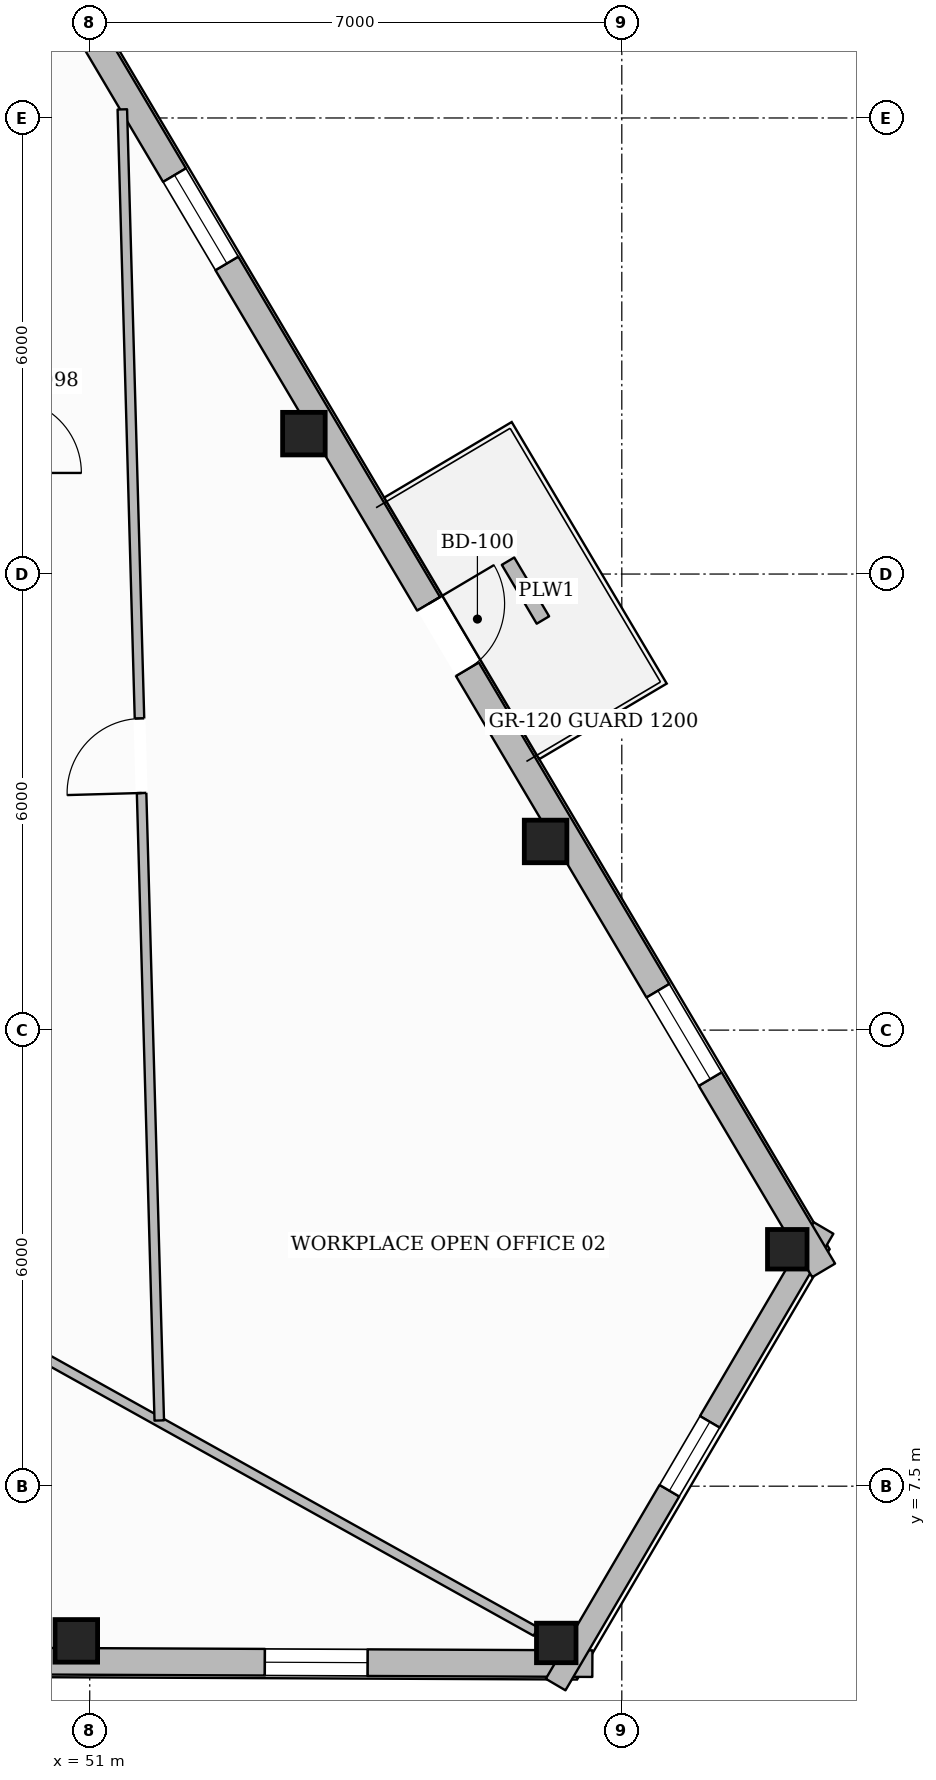
"""IFC4 building model, lengths in metres.
Left out: names, types, materials, properties, quantities, classifications, styles, units other than length and angle.
Written with IfcOpenShell. Run it as: python <this file> out.ifc"""

import sys

from ifc_helpers import new_model, si_unit, direction, frame, frame_2d, origin, origin_2d, place, context, subcontext, project, spatial, rectangle, hollow_rectangle, extrude, element, fill, save


model = new_model("IFC4")
c1 = context("Model", 3, precision=1e-05, world=origin(), true_north=direction((0.0, 1.0)))
c2 = subcontext(c1, "Body", "Model", "MODEL_VIEW")
j1 = project(units=[si_unit("LENGTHUNIT", "METRE"), si_unit("PLANEANGLEUNIT", "RADIAN")], contexts=[c1])
p1 = place(None, origin())
s1 = spatial("IfcSite", under=j1, at=p1, CompositionType="ELEMENT")
p2 = place(p1, origin())
s2 = spatial("IfcBuilding", under=s1, at=p2, CompositionType="ELEMENT")
p3 = place(p2, frame((0.0, 0.0, 270.3)))
s3 = spatial("IfcBuildingStorey", under=s2, at=p3, CompositionType="ELEMENT", Elevation=270.3)
p4 = place(p3, frame((50.823, 5.465, 0.0), z_axis=(0.0, 0.0, 1.0), x_axis=(1.0, 0.0, 0.0)))
e1 = element("IfcColumn", 1, at=p4, inside=s3, PredefinedType="COLUMN", context=c2, shape_type="SweptSolid", body=[
    extrude(hollow_rectangle(XDim=0.56, YDim=0.56, WallThickness=0.025, at=origin_2d()), origin(), (0.0, 0.0, 1.0), 3.61),
])
for number, where, z_axis, x_axis in (
    (2, (57.138, 5.438, 0.0), (0.0, 0.0, 1.0), (1.0, 0.0, 0.0)),
    (3, (60.177, 10.617, 0.0), (0.0, 0.0, 1.0), (1.0, 0.0, 0.0)),
):
    element("IfcColumn", number, at=place(p3, frame(where, z_axis=z_axis, x_axis=x_axis)), inside=s3, PredefinedType="COLUMN", context=c2, shape_type="SweptSolid", body=[
        extrude(hollow_rectangle(XDim=0.52, YDim=0.52, WallThickness=0.024, at=origin_2d()), origin(), (0.0, 0.0, 1.0), 3.61),
    ])
for number, where, z_axis, x_axis in (
    (4, (56.997, 15.982, 0.0), (0.0, 0.0, 1.0), (1.0, 0.0, 0.0)),
    (5, (53.817, 21.347, 0.0), (0.0, 0.0, 1.0), (1.0, 0.0, 0.0)),
):
    element("IfcColumn", number, at=place(p3, frame(where, z_axis=z_axis, x_axis=x_axis)), inside=s3, PredefinedType="COLUMN", context=c2, shape_type="SweptSolid", body=[
        extrude(hollow_rectangle(XDim=0.56, YDim=0.56, WallThickness=0.025, at=origin_2d()), origin(), (0.0, 0.0, 1.0), 3.61),
    ])
p5 = place(p3, frame((57.613, 5.165, 0.0), z_axis=(0.0, 0.0, 1.0), x_axis=(-0.99999050908, 0.004356805123, 0.0)))
e6 = element("IfcWall", 6, at=p5, inside=s3, PredefinedType="STANDARD", context=c2, shape_type="SweptSolid", body=[
    extrude(rectangle(XDim=38.833, YDim=0.35, at=frame_2d((19.417, 0.0))), origin(), (0.0, 0.0, 1.0), 3.196),
])
p6 = place(p5, frame((34.529, 0.0, 0.65)))
e7 = element("IfcOpeningElement", 7, at=p6, cuts=e6, PredefinedType="OPENING", context=c2, shape_type="SweptSolid", body=[
    extrude(rectangle(XDim=1.35, YDim=1.75, at=frame_2d((0.675, 0.875))), frame((0.0, 0.185, 0.0), z_axis=(0.0, -1.0, 0.0), x_axis=(1.0, 0.0, 0.0)), (0.0, 0.0, 1.0), 0.37),
])
p7 = place(p5, frame((28.215, 0.0, 0.65)))
e8 = element("IfcOpeningElement", 8, at=p7, cuts=e6, PredefinedType="OPENING", context=c2, shape_type="SweptSolid", body=[
    extrude(rectangle(XDim=1.35, YDim=1.75, at=frame_2d((0.675, 0.875))), frame((0.0, 0.185, 0.0), z_axis=(0.0, -1.0, 0.0), x_axis=(1.0, 0.0, 0.0)), (0.0, 0.0, 1.0), 0.37),
])
p8 = place(p5, frame((21.901, 0.0, 0.65)))
e9 = element("IfcOpeningElement", 9, at=p8, cuts=e6, PredefinedType="OPENING", context=c2, shape_type="SweptSolid", body=[
    extrude(rectangle(XDim=1.35, YDim=1.75, at=frame_2d((0.675, 0.875))), frame((0.0, 0.185, 0.0), z_axis=(0.0, -1.0, 0.0), x_axis=(1.0, 0.0, 0.0)), (0.0, 0.0, 1.0), 0.37),
])
p9 = place(p5, frame((9.272, 0.0, 0.65)))
e10 = element("IfcOpeningElement", 10, at=p9, cuts=e6, PredefinedType="OPENING", context=c2, shape_type="SweptSolid", body=[
    extrude(rectangle(XDim=1.35, YDim=1.75, at=frame_2d((0.675, 0.875))), frame((0.0, 0.185, 0.0), z_axis=(0.0, -1.0, 0.0), x_axis=(1.0, 0.0, 0.0)), (0.0, 0.0, 1.0), 0.37),
])
p10 = place(p5, frame((2.958, 0.0, 0.65)))
e11 = element("IfcOpeningElement", 11, at=p10, cuts=e6, PredefinedType="OPENING", context=c2, shape_type="SweptSolid", body=[
    extrude(rectangle(XDim=1.35, YDim=1.75, at=frame_2d((0.675, 0.875))), frame((0.0, 0.185, 0.0), z_axis=(0.0, -1.0, 0.0), x_axis=(1.0, 0.0, 0.0)), (0.0, 0.0, 1.0), 0.37),
])
p11 = place(p3, frame((60.654, 10.897, 0.0), z_axis=(0.0, 0.0, 1.0), x_axis=(-0.506109881411, -0.862469006943, 0.0)))
e12 = element("IfcWall", 12, at=p11, inside=s3, PredefinedType="STANDARD", context=c2, shape_type="SweptSolid", body=[
    extrude(rectangle(XDim=6.965, YDim=0.3, at=frame_2d((3.482, 0.0))), origin(), (0.0, 0.0, 1.0), 3.196),
])
p12 = place(p11, frame((2.957, 0.0, 0.65)))
e13 = element("IfcOpeningElement", 13, at=p12, cuts=e12, PredefinedType="OPENING", context=c2, shape_type="SweptSolid", body=[
    extrude(rectangle(XDim=1.05, YDim=1.7, at=frame_2d((0.525, 0.85))), frame((0.0, 0.16, 0.0), z_axis=(0.0, -1.0, 0.0), x_axis=(1.0, 0.0, 0.0)), (0.0, 0.0, 1.0), 0.32),
])
p13 = place(p3, frame((41.09, 43.352, 0.0), z_axis=(0.0, 0.0, 1.0), x_axis=(0.509850521087, -0.860263009868, 0.0)))
e14 = element("IfcWall", 14, at=p13, inside=s3, PredefinedType="STANDARD", context=c2, shape_type="SweptSolid", body=[
    extrude(rectangle(XDim=38.375, YDim=0.35, at=frame_2d((19.188, 0.0))), origin(), (0.0, 0.0, 1.0), 3.196),
])
p14 = place(p13, frame((28.181, 0.0, 0.0)))
e15 = element("IfcOpeningElement", 15, at=p14, cuts=e14, PredefinedType="OPENING", context=c2, shape_type="SweptSolid", body=[
    extrude(rectangle(XDim=1.0, YDim=2.2, at=frame_2d((0.5, 1.1))), frame((0.0, 0.185, 0.0), z_axis=(0.0, -1.0, 0.0), x_axis=(1.0, 0.0, 0.0)), (0.0, 0.0, 1.0), 0.37),
])
p15 = place(p13, frame((34.098, 0.0, 0.65)))
e16 = element("IfcOpeningElement", 16, at=p15, cuts=e14, PredefinedType="OPENING", context=c2, shape_type="SweptSolid", body=[
    extrude(rectangle(XDim=1.35, YDim=1.75, at=frame_2d((0.675, 0.875))), frame((0.0, 0.185, 0.0), z_axis=(0.0, -1.0, 0.0), x_axis=(1.0, 0.0, 0.0)), (0.0, 0.0, 1.0), 0.37),
])
p16 = place(p13, frame((21.625, 0.0, 0.65)))
e17 = element("IfcOpeningElement", 17, at=p16, cuts=e14, PredefinedType="OPENING", context=c2, shape_type="SweptSolid", body=[
    extrude(rectangle(XDim=1.35, YDim=1.75, at=frame_2d((0.675, 0.875))), frame((0.0, 0.185, 0.0), z_axis=(0.0, -1.0, 0.0), x_axis=(1.0, 0.0, 0.0)), (0.0, 0.0, 1.0), 0.37),
])
p17 = place(p13, frame((9.152, 0.0, 0.65)))
e18 = element("IfcOpeningElement", 18, at=p17, cuts=e14, PredefinedType="OPENING", context=c2, shape_type="SweptSolid", body=[
    extrude(rectangle(XDim=1.35, YDim=1.75, at=frame_2d((0.675, 0.875))), frame((0.0, 0.185, 0.0), z_axis=(0.0, -1.0, 0.0), x_axis=(1.0, 0.0, 0.0)), (0.0, 0.0, 1.0), 0.37),
])
p18 = place(p13, frame((2.915, 0.0, 0.65)))
e19 = element("IfcOpeningElement", 19, at=p18, cuts=e14, PredefinedType="OPENING", context=c2, shape_type="SweptSolid", body=[
    extrude(rectangle(XDim=1.35, YDim=1.75, at=frame_2d((0.675, 0.875))), frame((0.0, 0.185, 0.0), z_axis=(0.0, -1.0, 0.0), x_axis=(1.0, 0.0, 0.0)), (0.0, 0.0, 1.0), 0.37),
])
p19 = place(p3, frame((56.962, 18.895, 0.0), z_axis=(0.0, 0.0, 1.0), x_axis=(-0.509780079858, 0.860304754247, 0.0)))
e20 = element("IfcWall", 20, at=p19, inside=s3, PredefinedType="USERDEFINED", context=c2, shape_type="SweptSolid", body=[
    extrude(rectangle(XDim=0.9, YDim=0.19, at=frame_2d((0.45, 0.0))), origin(), (0.0, 0.0, 1.0), 0.5),
])
p20 = place(p3, frame((49.99, 9.419, 0.0), z_axis=(0.0, 0.0, 1.0), x_axis=(0.873576073391, -0.486687624662, 0.0)))
e21 = element("IfcWall", 21, at=p20, inside=s3, PredefinedType="PARTITIONING", context=c2, shape_type="SweptSolid", body=[
    extrude(rectangle(XDim=7.875, YDim=0.125, at=frame_2d((3.938, 0.0))), origin(), (0.0, 0.0, 1.0), 3.246),
])
p21 = place(p3, frame((51.915, 8.365, 0.0), z_axis=(0.0, 0.0, 1.0), x_axis=(-0.028169991023, 0.999603147057, 0.0)))
e22 = element("IfcWall", 22, at=p21, inside=s3, PredefinedType="PARTITIONING", context=c2, shape_type="SweptSolid", body=[
    extrude(rectangle(XDim=17.255, YDim=0.125, at=frame_2d((8.628, 0.0))), origin(), (0.0, 0.0, 1.0), 3.199),
])
p22 = place(p21, frame((8.259, 0.0, 0.0)))
e23 = element("IfcOpeningElement", 23, at=p22, cuts=e22, PredefinedType="OPENING", context=c2, shape_type="SweptSolid", body=[
    extrude(rectangle(XDim=0.98, YDim=2.15, at=frame_2d((0.49, 1.075))), frame((0.0, 0.073, 0.0), z_axis=(0.0, -1.0, 0.0), x_axis=(1.0, 0.0, 0.0)), (0.0, 0.0, 1.0), 0.145),
])
p23 = place(p14, origin())
e24 = element("IfcDoor", 24, at=p23, inside=s3, OperationType="SINGLE_SWING_LEFT", PredefinedType="DOOR", context=c2, shape_type="SweptSolid", body=[
    extrude(rectangle(XDim=1.0, YDim=2.2, at=frame_2d((0.5, 1.1))), frame((0.0, 0.025, 0.0), z_axis=(0.0, -1.0, 0.0), x_axis=(1.0, 0.0, 0.0)), (0.0, 0.0, 1.0), 0.05),
])
fill(e15, e24)
p24 = place(p10, origin())
e25 = element("IfcWindow", 25, at=p24, inside=s3, PartitioningType="SINGLE_PANEL", PredefinedType="WINDOW", context=c2, shape_type="SweptSolid", body=[
    extrude(rectangle(XDim=1.35, YDim=1.75, at=frame_2d((0.675, 0.875))), frame((0.0, 0.03, 0.0), z_axis=(0.0, -1.0, 0.0), x_axis=(1.0, 0.0, 0.0)), (0.0, 0.0, 1.0), 0.06),
])
fill(e11, e25)
p25 = place(p15, origin())
e26 = element("IfcWindow", 26, at=p25, inside=s3, PartitioningType="SINGLE_PANEL", PredefinedType="WINDOW", context=c2, shape_type="SweptSolid", body=[
    extrude(rectangle(XDim=1.35, YDim=1.75, at=frame_2d((0.675, 0.875))), frame((0.0, 0.03, 0.0), z_axis=(0.0, -1.0, 0.0), x_axis=(1.0, 0.0, 0.0)), (0.0, 0.0, 1.0), 0.06),
])
fill(e16, e26)
p26 = place(p16, origin())
e27 = element("IfcWindow", 27, at=p26, inside=s3, PartitioningType="SINGLE_PANEL", PredefinedType="WINDOW", context=c2, shape_type="SweptSolid", body=[
    extrude(rectangle(XDim=1.35, YDim=1.75, at=frame_2d((0.675, 0.875))), frame((0.0, 0.03, 0.0), z_axis=(0.0, -1.0, 0.0), x_axis=(1.0, 0.0, 0.0)), (0.0, 0.0, 1.0), 0.06),
])
fill(e17, e27)
p27 = place(p12, origin())
e28 = element("IfcWindow", 28, at=p27, inside=s3, PartitioningType="SINGLE_PANEL", PredefinedType="WINDOW", context=c2, shape_type="SweptSolid", body=[
    extrude(rectangle(XDim=1.05, YDim=1.7, at=frame_2d((0.525, 0.85))), frame((0.0, 0.03, 0.0), z_axis=(0.0, -1.0, 0.0), x_axis=(1.0, 0.0, 0.0)), (0.0, 0.0, 1.0), 0.06),
])
fill(e13, e28)
p28 = place(p22, origin())
e29 = element("IfcDoor", 29, at=p28, inside=s3, OperationType="SINGLE_SWING_LEFT", PredefinedType="DOOR", context=c2, shape_type="SweptSolid", body=[
    extrude(rectangle(XDim=0.98, YDim=2.15, at=frame_2d((0.49, 1.075))), frame((0.0, 0.025, 0.0), z_axis=(0.0, -1.0, 0.0), x_axis=(1.0, 0.0, 0.0)), (0.0, 0.0, 1.0), 0.05),
])
fill(e23, e29)
save(model, sys.argv[1])
